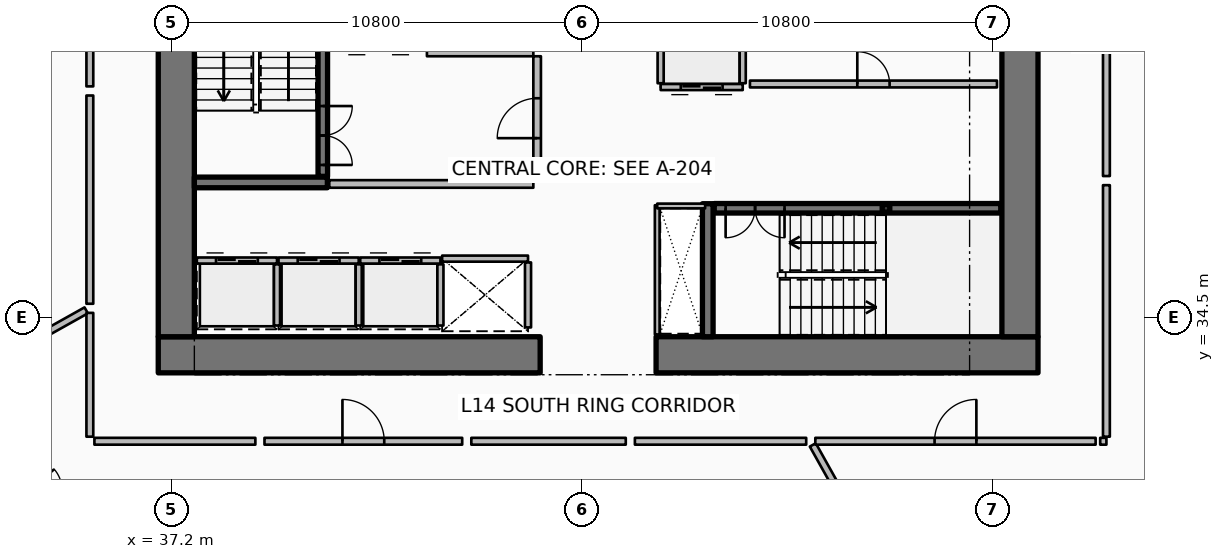
"""IFC4 building model, lengths in metres.
Left out: names, types, materials, properties, quantities, classifications, styles, units other than length and angle.
Written with IfcOpenShell. Run it as: python <this file> out.ifc"""

import sys

from ifc_helpers import new_model, si_unit, direction, frame, frame_2d, origin, origin_2d, place, context, subcontext, project, spatial, rectangle, hollow_rectangle, extrude, element, fill, save


model = new_model("IFC4")
c1 = context("Model", 3, precision=1e-05, world=origin(), true_north=direction((0.0, 1.0)))
c2 = subcontext(c1, "Body", "Model", "MODEL_VIEW")
j1 = project(units=[si_unit("LENGTHUNIT", "METRE"), si_unit("PLANEANGLEUNIT", "RADIAN")], contexts=[c1])
p1 = place(None, origin())
s1 = spatial("IfcSite", under=j1, at=p1, CompositionType="ELEMENT")
p2 = place(p1, origin())
s2 = spatial("IfcBuilding", under=s1, at=p2, CompositionType="ELEMENT")
p3 = place(p2, frame((0.0, 0.0, 60.15)))
s3 = spatial("IfcBuildingStorey", under=s2, at=p3, CompositionType="ELEMENT", Elevation=60.15)
p4 = place(p3, frame((36.85, 33.525, 0.0), z_axis=(0.0, 0.0, 1.0), x_axis=(1.0, 0.0, 0.0)))
e1 = element("IfcWall", 1, at=p4, inside=s3, PredefinedType="SHEAR", context=c2, shape_type="SweptSolid", body=[
    extrude(rectangle(XDim=10.05, YDim=0.95, at=frame_2d((5.025, 0.0))), origin(), (0.0, 0.0, 1.0), 3.75),
])
p5 = place(p3, frame((49.95, 33.525, 0.0), z_axis=(0.0, 0.0, 1.0), x_axis=(1.0, 0.0, 0.0)))
e2 = element("IfcWall", 2, at=p5, inside=s3, PredefinedType="SHEAR", context=c2, shape_type="SweptSolid", body=[
    extrude(rectangle(XDim=10.05, YDim=0.95, at=frame_2d((5.025, 0.0))), origin(), (0.0, 0.0, 1.0), 3.75),
])
for number, where, z_axis, x_axis in (
    (3, (37.325, 34.0, 0.0), (0.0, 0.0, 1.0), (0.0, 1.0, 0.0)),
    (4, (59.525, 34.0, 0.0), (0.0, 0.0, 1.0), (0.0, 1.0, 0.0)),
):
    element("IfcWall", number, at=place(p3, frame(where, z_axis=z_axis, x_axis=x_axis)), inside=s3, PredefinedType="SHEAR", context=c2, shape_type="SweptSolid", body=[
        extrude(rectangle(XDim=16.0, YDim=0.95, at=frame_2d((8.0, 0.0))), origin(), (0.0, 0.0, 1.0), 3.75),
    ])
for number, where, z_axis, x_axis in (
    (5, (37.8, 38.06, 0.0), (0.0, 0.0, 1.0), (1.0, 0.0, 0.0)),
    (6, (51.31, 34.0, 0.0), (0.0, 0.0, 1.0), (0.0, 1.0, 0.0)),
):
    element("IfcWall", number, at=place(p3, frame(where, z_axis=z_axis, x_axis=x_axis)), inside=s3, PredefinedType="SHEAR", context=c2, shape_type="SweptSolid", body=[
        extrude(rectangle(XDim=3.5, YDim=0.28, at=frame_2d((1.75, 0.0))), origin(), (0.0, 0.0, 1.0), 3.75),
    ])
p6 = place(p3, frame((56.0, 37.38, 0.0), z_axis=(0.0, 0.0, 1.0), x_axis=(1.0, 0.0, 0.0)))
e7 = element("IfcColumn", 7, at=p6, inside=s3, PredefinedType="COLUMN", context=c2, shape_type="SweptSolid", body=[
    extrude(hollow_rectangle(XDim=0.2, YDim=0.2, WallThickness=0.01, InnerFilletRadius=0.01, OuterFilletRadius=0.02, at=origin_2d()), origin(), (0.0, 0.0, 1.0), 1.67),
])
p7 = place(p3, frame((41.18, 38.22, 0.0), z_axis=(0.0, 0.0, 1.0), x_axis=(0.0, 1.0, 0.0)))
e8 = element("IfcWall", 8, at=p7, inside=s3, PredefinedType="SOLIDWALL", context=c2, shape_type="SweptSolid", body=[
    extrude(rectangle(XDim=7.56, YDim=0.25, at=frame_2d((3.78, 0.0))), origin(), (0.0, 0.0, 1.0), 3.5),
])
p8 = place(p7, frame((0.3, 0.0, 0.0)))
e9 = element("IfcOpeningElement", 9, at=p8, cuts=e8, PredefinedType="OPENING", context=c2, shape_type="SweptSolid", body=[
    extrude(rectangle(XDim=1.55, YDim=2.15, at=frame_2d((0.775, 1.075))), frame((0.0, 0.135, 0.0), z_axis=(0.0, -1.0, 0.0), x_axis=(1.0, 0.0, 0.0)), (0.0, 0.0, 1.0), 0.27),
])
p9 = place(p3, frame((51.48, 37.38, 0.0), z_axis=(0.0, 0.0, 1.0), x_axis=(1.0, 0.0, 0.0)))
e10 = element("IfcWall", 10, at=p9, inside=s3, PredefinedType="SOLIDWALL", context=c2, shape_type="SweptSolid", body=[
    extrude(rectangle(XDim=7.54, YDim=0.25, at=frame_2d((3.77, 0.0))), origin(), (0.0, 0.0, 1.0), 3.5),
])
p10 = place(p9, frame((0.3, 0.0, 0.0)))
e11 = element("IfcOpeningElement", 11, at=p10, cuts=e10, PredefinedType="OPENING", context=c2, shape_type="SweptSolid", body=[
    extrude(rectangle(XDim=1.55, YDim=2.15, at=frame_2d((0.775, 1.075))), frame((0.0, 0.135, 0.0), z_axis=(0.0, -1.0, 0.0), x_axis=(1.0, 0.0, 0.0)), (0.0, 0.0, 1.0), 0.27),
])
p11 = place(p3, frame((37.865, 36.005, 0.0), z_axis=(0.0, 0.0, 1.0), x_axis=(1.0, 0.0, 0.0)))
e12 = element("IfcWall", 12, at=p11, inside=s3, PredefinedType="PARTITIONING", context=c2, shape_type="SweptSolid", body=[
    extrude(rectangle(XDim=2.11, YDim=0.16, at=frame_2d((1.055, 0.0))), origin(), (0.0, 0.0, 1.0), 3.5),
])
p12 = place(p11, frame((0.505, 0.0, 0.0)))
e13 = element("IfcOpeningElement", 13, at=p12, cuts=e12, PredefinedType="OPENING", context=c2, shape_type="SweptSolid", body=[
    extrude(rectangle(XDim=1.1, YDim=2.1, at=frame_2d((0.55, 1.05))), frame((0.0, 0.09, 0.0), z_axis=(0.0, -1.0, 0.0), x_axis=(1.0, 0.0, 0.0)), (0.0, 0.0, 1.0), 0.18),
])
p13 = place(p3, frame((39.975, 34.295, 0.0), z_axis=(0.0, 0.0, 1.0), x_axis=(0.0, 1.0, 0.0)))
e14 = element("IfcWall", 14, at=p13, inside=s3, PredefinedType="PARTITIONING", context=c2, shape_type="SweptSolid", body=[
    extrude(rectangle(XDim=1.61, YDim=0.16, at=frame_2d((0.805, 0.0))), origin(), (0.0, 0.0, 1.0), 3.5),
])
p14 = place(p3, frame((40.015, 36.005, 0.0), z_axis=(0.0, 0.0, 1.0), x_axis=(1.0, 0.0, 0.0)))
e15 = element("IfcWall", 15, at=p14, inside=s3, PredefinedType="PARTITIONING", context=c2, shape_type="SweptSolid", body=[
    extrude(rectangle(XDim=2.11, YDim=0.16, at=frame_2d((1.055, 0.0))), origin(), (0.0, 0.0, 1.0), 3.5),
])
p15 = place(p14, frame((0.505, 0.0, 0.0)))
e16 = element("IfcOpeningElement", 16, at=p15, cuts=e15, PredefinedType="OPENING", context=c2, shape_type="SweptSolid", body=[
    extrude(rectangle(XDim=1.1, YDim=2.1, at=frame_2d((0.55, 1.05))), frame((0.0, 0.09, 0.0), z_axis=(0.0, -1.0, 0.0), x_axis=(1.0, 0.0, 0.0)), (0.0, 0.0, 1.0), 0.18),
])
p16 = place(p3, frame((42.125, 34.295, 0.0), z_axis=(0.0, 0.0, 1.0), x_axis=(0.0, 1.0, 0.0)))
e17 = element("IfcWall", 17, at=p16, inside=s3, PredefinedType="PARTITIONING", context=c2, shape_type="SweptSolid", body=[
    extrude(rectangle(XDim=1.61, YDim=0.16, at=frame_2d((0.805, 0.0))), origin(), (0.0, 0.0, 1.0), 3.5),
])
p17 = place(p3, frame((42.165, 36.005, 0.0), z_axis=(0.0, 0.0, 1.0), x_axis=(1.0, 0.0, 0.0)))
e18 = element("IfcWall", 18, at=p17, inside=s3, PredefinedType="PARTITIONING", context=c2, shape_type="SweptSolid", body=[
    extrude(rectangle(XDim=2.11, YDim=0.16, at=frame_2d((1.055, 0.0))), origin(), (0.0, 0.0, 1.0), 3.5),
])
p18 = place(p17, frame((0.505, 0.0, 0.0)))
e19 = element("IfcOpeningElement", 19, at=p18, cuts=e18, PredefinedType="OPENING", context=c2, shape_type="SweptSolid", body=[
    extrude(rectangle(XDim=1.1, YDim=2.1, at=frame_2d((0.55, 1.05))), frame((0.0, 0.09, 0.0), z_axis=(0.0, -1.0, 0.0), x_axis=(1.0, 0.0, 0.0)), (0.0, 0.0, 1.0), 0.18),
])
p19 = place(p3, frame((44.275, 34.295, 0.0), z_axis=(0.0, 0.0, 1.0), x_axis=(0.0, 1.0, 0.0)))
e20 = element("IfcWall", 20, at=p19, inside=s3, PredefinedType="PARTITIONING", context=c2, shape_type="SweptSolid", body=[
    extrude(rectangle(XDim=1.61, YDim=0.16, at=frame_2d((0.805, 0.0))), origin(), (0.0, 0.0, 1.0), 3.5),
])
p20 = place(p3, frame((44.32, 36.055, 0.0), z_axis=(0.0, 0.0, 1.0), x_axis=(1.0, 0.0, 0.0)))
e21 = element("IfcWall", 21, at=p20, inside=s3, PredefinedType="PARTITIONING", context=c2, shape_type="SweptSolid", body=[
    extrude(rectangle(XDim=2.26, YDim=0.16, at=frame_2d((1.13, 0.0))), origin(), (0.0, 0.0, 1.0), 3.5),
])
p21 = place(p3, frame((46.58, 34.245, 0.0), z_axis=(0.0, 0.0, 1.0), x_axis=(0.0, 1.0, 0.0)))
e22 = element("IfcWall", 22, at=p21, inside=s3, PredefinedType="PARTITIONING", context=c2, shape_type="SweptSolid", body=[
    extrude(rectangle(XDim=1.71, YDim=0.16, at=frame_2d((0.855, 0.0))), origin(), (0.0, 0.0, 1.0), 3.5),
])
p22 = place(p3, frame((52.23, 40.57, 0.0), z_axis=(0.0, 0.0, 1.0), x_axis=(-1.0, 0.0, 0.0)))
e23 = element("IfcWall", 23, at=p22, inside=s3, PredefinedType="PARTITIONING", context=c2, shape_type="SweptSolid", body=[
    extrude(rectangle(XDim=2.16, YDim=0.16, at=frame_2d((1.08, 0.0))), origin(), (0.0, 0.0, 1.0), 3.5),
])
p23 = place(p22, frame((0.53, 0.0, 0.0)))
e24 = element("IfcOpeningElement", 24, at=p23, cuts=e23, PredefinedType="OPENING", context=c2, shape_type="SweptSolid", body=[
    extrude(rectangle(XDim=1.1, YDim=2.1, at=frame_2d((0.55, 1.05))), frame((0.0, 0.09, 0.0), z_axis=(0.0, -1.0, 0.0), x_axis=(1.0, 0.0, 0.0)), (0.0, 0.0, 1.0), 0.18),
])
for number, where, z_axis, x_axis in (
    (25, (52.23, 40.67, 0.0), (0.0, 0.0, 1.0), (0.0, 1.0, 0.0)),
    (26, (50.07, 40.67, 0.0), (0.0, 0.0, 1.0), (0.0, 1.0, 0.0)),
):
    element("IfcWall", number, at=place(p3, frame(where, z_axis=z_axis, x_axis=x_axis)), inside=s3, PredefinedType="PARTITIONING", context=c2, shape_type="SweptSolid", body=[
        extrude(rectangle(XDim=2.16, YDim=0.16, at=frame_2d((1.08, 0.0))), origin(), (0.0, 0.0, 1.0), 3.5),
    ])
p24 = place(p3, frame((52.42, 40.65, 0.0), z_axis=(0.0, 0.0, 1.0), x_axis=(1.0, 0.0, 0.0)))
e27 = element("IfcWall", 27, at=p24, inside=s3, PredefinedType="PARTITIONING", context=c2, shape_type="SweptSolid", body=[
    extrude(rectangle(XDim=6.5, YDim=0.18, at=frame_2d((3.25, 0.0))), origin(), (0.0, 0.0, 1.0), 3.5),
])
p25 = place(p24, frame((2.825, 0.0, 0.0)))
e28 = element("IfcOpeningElement", 28, at=p25, cuts=e27, PredefinedType="OPENING", context=c2, shape_type="SweptSolid", body=[
    extrude(rectangle(XDim=0.85, YDim=2.06, at=frame_2d((0.425, 1.03))), frame((0.0, 0.1, 0.0), z_axis=(0.0, -1.0, 0.0), x_axis=(1.0, 0.0, 0.0)), (0.0, 0.0, 1.0), 0.2),
])
p26 = place(p3, frame((41.35, 38.02, 0.0), z_axis=(0.0, 0.0, 1.0), x_axis=(1.0, 0.0, 0.0)))
e29 = element("IfcWall", 29, at=p26, inside=s3, PredefinedType="PARTITIONING", context=c2, shape_type="SweptSolid", body=[
    extrude(rectangle(XDim=5.37, YDim=0.2, at=frame_2d((2.685, 0.0))), origin(), (0.0, 0.0, 1.0), 3.5),
])
p27 = place(p3, frame((43.92, 41.48, 0.0), z_axis=(0.0, 0.0, 1.0), x_axis=(1.0, 0.0, 0.0)))
e30 = element("IfcWall", 30, at=p27, inside=s3, PredefinedType="PARTITIONING", context=c2, shape_type="SweptSolid", body=[
    extrude(rectangle(XDim=2.8, YDim=0.2, at=frame_2d((1.4, 0.0))), origin(), (0.0, 0.0, 1.0), 3.5),
])
p28 = place(p3, frame((46.82, 38.12, 0.0), z_axis=(0.0, 0.0, 1.0), x_axis=(0.0, 1.0, 0.0)))
e31 = element("IfcWall", 31, at=p28, inside=s3, PredefinedType="PARTITIONING", context=c2, shape_type="SweptSolid", body=[
    extrude(rectangle(XDim=3.26, YDim=0.2, at=frame_2d((1.63, 0.0))), origin(), (0.0, 0.0, 1.0), 3.5),
])
p29 = place(p28, frame((1.105, 0.0, 0.0)))
e32 = element("IfcOpeningElement", 32, at=p29, cuts=e31, PredefinedType="OPENING", context=c2, shape_type="SweptSolid", body=[
    extrude(rectangle(XDim=1.05, YDim=2.1, at=frame_2d((0.525, 1.05))), frame((0.0, 0.11, 0.0), z_axis=(0.0, -1.0, 0.0), x_axis=(1.0, 0.0, 0.0)), (0.0, 0.0, 1.0), 0.22),
])
p30 = place(p3, frame((49.98, 34.06, 0.0), z_axis=(0.0, 0.0, 1.0), x_axis=(0.0, 1.0, 0.0)))
e33 = element("IfcWall", 33, at=p30, inside=s3, PredefinedType="PARTITIONING", context=c2, shape_type="SweptSolid", body=[
    extrude(rectangle(XDim=3.4, YDim=0.125, at=frame_2d((1.7, 0.0))), origin(), (0.0, 0.0, 1.0), 2.94),
])
p31 = place(p3, frame((49.98, 37.44, 0.0), z_axis=(0.0, 0.0, 1.0), x_axis=(1.0, 0.0, 0.0)))
e34 = element("IfcWall", 34, at=p31, inside=s3, PredefinedType="PARTITIONING", context=c2, shape_type="SweptSolid", body=[
    extrude(rectangle(XDim=1.26, YDim=0.125, at=frame_2d((0.63, 0.0))), origin(), (0.0, 0.0, 1.0), 2.94),
])
p32 = place(p3, frame((34.954, 34.694, 0.0), z_axis=(0.0, 0.0, 1.0), x_axis=(-0.872493465611, -0.488625779577, 0.0)))
e35 = element("IfcWall", 35, at=p32, inside=s3, PredefinedType="PARTITIONING", context=c2, shape_type="SweptSolid", body=[
    extrude(rectangle(XDim=16.586, YDim=0.18, at=frame_2d((8.293, 0.0))), origin(), (0.0, 0.0, 1.0), 2.867),
])
p33 = place(p3, frame((54.074, 31.154, 0.0), z_axis=(0.0, 0.0, 1.0), x_axis=(0.48862612996, -0.872493269384, 0.0)))
e36 = element("IfcWall", 36, at=p33, inside=s3, PredefinedType="PARTITIONING", context=c2, shape_type="SweptSolid", body=[
    extrude(rectangle(XDim=13.065, YDim=0.18, at=frame_2d((6.532, 0.0))), origin(), (0.0, 0.0, 1.0), 2.867),
])
p34 = place(p3, frame((35.05, 45.532, 0.0), z_axis=(0.0, 0.0, 1.0), x_axis=(0.0, -1.0, 0.0)))
e37 = element("IfcWall", 37, at=p34, inside=s3, PredefinedType="PARTITIONING", context=c2, shape_type="SweptSolid", body=[
    extrude(rectangle(XDim=4.945, YDim=0.18, at=frame_2d((2.472, 0.0))), origin(), (0.0, 0.0, 1.0), 2.867),
])
p35 = place(p3, frame((35.05, 40.347, 0.0), z_axis=(0.0, 0.0, 1.0), x_axis=(0.0, -1.0, 0.0)))
e38 = element("IfcWall", 38, at=p35, inside=s3, PredefinedType="PARTITIONING", context=c2, shape_type="SweptSolid", body=[
    extrude(rectangle(XDim=5.48, YDim=0.18, at=frame_2d((2.74, 0.0))), origin(), (0.0, 0.0, 1.0), 2.867),
])
p36 = place(p3, frame((39.646, 31.25, 0.0), z_axis=(0.0, 0.0, 1.0), x_axis=(1.0, 0.0, 0.0)))
e39 = element("IfcWall", 39, at=p36, inside=s3, PredefinedType="PARTITIONING", context=c2, shape_type="SweptSolid", body=[
    extrude(rectangle(XDim=5.203, YDim=0.18, at=frame_2d((2.601, 0.0))), origin(), (0.0, 0.0, 1.0), 2.867),
])
p37 = place(p36, frame((2.052, 0.0, 0.0)))
e40 = element("IfcOpeningElement", 40, at=p37, cuts=e39, PredefinedType="OPENING", context=c2, shape_type="SweptSolid", body=[
    extrude(rectangle(XDim=1.1, YDim=2.1, at=frame_2d((0.55, 1.05))), frame((0.0, 0.1, 0.0), z_axis=(0.0, -1.0, 0.0), x_axis=(1.0, 0.0, 0.0)), (0.0, 0.0, 1.0), 0.2),
])
p38 = place(p3, frame((35.05, 34.628, 0.0), z_axis=(0.0, 0.0, 1.0), x_axis=(0.0, -1.0, 0.0)))
e41 = element("IfcWall", 41, at=p38, inside=s3, PredefinedType="PARTITIONING", context=c2, shape_type="SweptSolid", body=[
    extrude(rectangle(XDim=3.258, YDim=0.18, at=frame_2d((1.629, 0.0))), origin(), (0.0, 0.0, 1.0), 2.867),
])
p39 = place(p3, frame((35.17, 31.25, 0.0), z_axis=(0.0, 0.0, 1.0), x_axis=(1.0, 0.0, 0.0)))
e42 = element("IfcWall", 42, at=p39, inside=s3, PredefinedType="PARTITIONING", context=c2, shape_type="SweptSolid", body=[
    extrude(rectangle(XDim=4.236, YDim=0.18, at=frame_2d((2.118, 0.0))), origin(), (0.0, 0.0, 1.0), 2.867),
])
p40 = place(p3, frame((33.075, 30.413, 0.0), z_axis=(0.0, 0.0, 1.0), x_axis=(0.655021066846, -0.755610615322, 0.0)))
e43 = element("IfcWall", 43, at=p40, inside=s3, PredefinedType="PARTITIONING", context=c2, shape_type="SweptSolid", body=[
    extrude(rectangle(XDim=2.053, YDim=0.125, at=frame_2d((1.027, 0.0))), origin(), (0.0, 0.0, 1.0), 2.94),
])
p41 = place(p40, frame((0.602, 0.0, 0.0)))
e44 = element("IfcOpeningElement", 44, at=p41, cuts=e43, PredefinedType="OPENING", context=c2, shape_type="SweptSolid", body=[
    extrude(rectangle(XDim=0.85, YDim=2.06, at=frame_2d((0.425, 1.03))), frame((0.0, 0.073, 0.0), z_axis=(0.0, -1.0, 0.0), x_axis=(1.0, 0.0, 0.0)), (0.0, 0.0, 1.0), 0.145),
])
p42 = place(p3, frame((45.088, 31.25, 0.0), z_axis=(0.0, 0.0, 1.0), x_axis=(1.0, 0.0, 0.0)))
e45 = element("IfcWall", 45, at=p42, inside=s3, PredefinedType="PARTITIONING", context=c2, shape_type="SweptSolid", body=[
    extrude(rectangle(XDim=4.064, YDim=0.18, at=frame_2d((2.032, 0.0))), origin(), (0.0, 0.0, 1.0), 2.867),
])
p43 = place(p3, frame((49.392, 31.25, 0.0), z_axis=(0.0, 0.0, 1.0), x_axis=(1.0, 0.0, 0.0)))
e46 = element("IfcWall", 46, at=p43, inside=s3, PredefinedType="PARTITIONING", context=c2, shape_type="SweptSolid", body=[
    extrude(rectangle(XDim=4.508, YDim=0.18, at=frame_2d((2.254, 0.0))), origin(), (0.0, 0.0, 1.0), 2.867),
])
p44 = place(p3, frame((54.14, 31.25, 0.0), z_axis=(0.0, 0.0, 1.0), x_axis=(1.0, 0.0, 0.0)))
e47 = element("IfcWall", 47, at=p44, inside=s3, PredefinedType="PARTITIONING", context=c2, shape_type="SweptSolid", body=[
    extrude(rectangle(XDim=7.376, YDim=0.18, at=frame_2d((3.688, 0.0))), origin(), (0.0, 0.0, 1.0), 2.867),
])
p45 = place(p44, frame((3.138, 0.0, 0.0)))
e48 = element("IfcOpeningElement", 48, at=p45, cuts=e47, PredefinedType="OPENING", context=c2, shape_type="SweptSolid", body=[
    extrude(rectangle(XDim=1.1, YDim=2.1, at=frame_2d((0.55, 1.05))), frame((0.0, 0.1, 0.0), z_axis=(0.0, -1.0, 0.0), x_axis=(1.0, 0.0, 0.0)), (0.0, 0.0, 1.0), 0.2),
])
p46 = place(p3, frame((61.636, 31.25, 0.0), z_axis=(0.0, 0.0, 1.0), x_axis=(1.0, 0.0, 0.0)))
e49 = element("IfcWall", 49, at=p46, inside=s3, PredefinedType="PARTITIONING", context=c2, shape_type="SweptSolid", body=[
    extrude(rectangle(XDim=0.164, YDim=0.18, at=frame_2d((0.082, 0.0))), origin(), (0.0, 0.0, 1.0), 2.867),
])
p47 = place(p3, frame((61.8, 31.37, 0.0), z_axis=(0.0, 0.0, 1.0), x_axis=(0.0, 1.0, 0.0)))
e50 = element("IfcWall", 50, at=p47, inside=s3, PredefinedType="PARTITIONING", context=c2, shape_type="SweptSolid", body=[
    extrude(rectangle(XDim=6.618, YDim=0.18, at=frame_2d((3.309, 0.0))), origin(), (0.0, 0.0, 1.0), 2.867),
])
p48 = place(p3, frame((61.8, 38.228, 0.0), z_axis=(0.0, 0.0, 1.0), x_axis=(0.0, 1.0, 0.0)))
e51 = element("IfcWall", 51, at=p48, inside=s3, PredefinedType="PARTITIONING", context=c2, shape_type="SweptSolid", body=[
    extrude(rectangle(XDim=5.285, YDim=0.18, at=frame_2d((2.643, 0.0))), origin(), (0.0, 0.0, 1.0), 2.867),
])
p49 = place(p8, origin())
e52 = element("IfcDoor", 52, at=p49, inside=s3, OperationType="DOUBLE_DOOR_SINGLE_SWING", PredefinedType="DOOR", context=c2, shape_type="SweptSolid", body=[
    extrude(rectangle(XDim=1.55, YDim=2.15, at=frame_2d((0.775, 1.075))), frame((0.0, 0.025, 0.0), z_axis=(0.0, -1.0, 0.0), x_axis=(1.0, 0.0, 0.0)), (0.0, 0.0, 1.0), 0.05),
])
fill(e9, e52)
p50 = place(p10, origin())
e53 = element("IfcDoor", 53, at=p50, inside=s3, OperationType="DOUBLE_DOOR_SINGLE_SWING", PredefinedType="DOOR", context=c2, shape_type="SweptSolid", body=[
    extrude(rectangle(XDim=1.55, YDim=2.15, at=frame_2d((0.775, 1.075))), frame((0.0, 0.025, 0.0), z_axis=(0.0, -1.0, 0.0), x_axis=(1.0, 0.0, 0.0)), (0.0, 0.0, 1.0), 0.05),
])
fill(e11, e53)
p51 = place(p12, origin())
e54 = element("IfcDoor", 54, at=p51, inside=s3, OperationType="DOUBLE_DOOR_SLIDING", PredefinedType="DOOR", context=c2, shape_type="SweptSolid", body=[
    extrude(rectangle(XDim=1.1, YDim=2.1, at=frame_2d((0.55, 1.05))), frame((0.0, 0.025, 0.0), z_axis=(0.0, -1.0, 0.0), x_axis=(1.0, 0.0, 0.0)), (0.0, 0.0, 1.0), 0.05),
])
fill(e13, e54)
p52 = place(p15, origin())
e55 = element("IfcDoor", 55, at=p52, inside=s3, OperationType="DOUBLE_DOOR_SLIDING", PredefinedType="DOOR", context=c2, shape_type="SweptSolid", body=[
    extrude(rectangle(XDim=1.1, YDim=2.1, at=frame_2d((0.55, 1.05))), frame((0.0, 0.025, 0.0), z_axis=(0.0, -1.0, 0.0), x_axis=(1.0, 0.0, 0.0)), (0.0, 0.0, 1.0), 0.05),
])
fill(e16, e55)
p53 = place(p18, origin())
e56 = element("IfcDoor", 56, at=p53, inside=s3, OperationType="DOUBLE_DOOR_SLIDING", PredefinedType="DOOR", context=c2, shape_type="SweptSolid", body=[
    extrude(rectangle(XDim=1.1, YDim=2.1, at=frame_2d((0.55, 1.05))), frame((0.0, 0.025, 0.0), z_axis=(0.0, -1.0, 0.0), x_axis=(1.0, 0.0, 0.0)), (0.0, 0.0, 1.0), 0.05),
])
fill(e19, e56)
p54 = place(p23, origin())
e57 = element("IfcDoor", 57, at=p54, inside=s3, OperationType="DOUBLE_DOOR_SLIDING", PredefinedType="DOOR", context=c2, shape_type="SweptSolid", body=[
    extrude(rectangle(XDim=1.1, YDim=2.1, at=frame_2d((0.55, 1.05))), frame((0.0, 0.025, 0.0), z_axis=(0.0, -1.0, 0.0), x_axis=(1.0, 0.0, 0.0)), (0.0, 0.0, 1.0), 0.05),
])
fill(e24, e57)
p55 = place(p25, origin())
e58 = element("IfcDoor", 58, at=p55, inside=s3, OperationType="SINGLE_SWING_LEFT", PredefinedType="DOOR", context=c2, shape_type="SweptSolid", body=[
    extrude(rectangle(XDim=0.85, YDim=2.06, at=frame_2d((0.425, 1.03))), frame((0.0, 0.025, 0.0), z_axis=(0.0, -1.0, 0.0), x_axis=(1.0, 0.0, 0.0)), (0.0, 0.0, 1.0), 0.05),
])
fill(e28, e58)
p56 = place(p29, origin())
e59 = element("IfcDoor", 59, at=p56, inside=s3, OperationType="SINGLE_SWING_LEFT", PredefinedType="DOOR", context=c2, shape_type="SweptSolid", body=[
    extrude(rectangle(XDim=1.05, YDim=2.1, at=frame_2d((0.525, 1.05))), frame((0.0, 0.025, 0.0), z_axis=(0.0, -1.0, 0.0), x_axis=(1.0, 0.0, 0.0)), (0.0, 0.0, 1.0), 0.05),
])
fill(e32, e59)
p57 = place(p37, origin())
e60 = element("IfcDoor", 60, at=p57, inside=s3, OperationType="SINGLE_SWING_LEFT", PredefinedType="DOOR", context=c2, shape_type="SweptSolid", body=[
    extrude(rectangle(XDim=1.1, YDim=2.1, at=frame_2d((0.55, 1.05))), frame((0.0, 0.025, 0.0), z_axis=(0.0, -1.0, 0.0), x_axis=(1.0, 0.0, 0.0)), (0.0, 0.0, 1.0), 0.05),
])
fill(e40, e60)
p58 = place(p45, origin())
e61 = element("IfcDoor", 61, at=p58, inside=s3, OperationType="SINGLE_SWING_RIGHT", PredefinedType="DOOR", context=c2, shape_type="SweptSolid", body=[
    extrude(rectangle(XDim=1.1, YDim=2.1, at=frame_2d((0.55, 1.05))), frame((0.0, 0.025, 0.0), z_axis=(0.0, -1.0, 0.0), x_axis=(1.0, 0.0, 0.0)), (0.0, 0.0, 1.0), 0.05),
])
fill(e48, e61)
save(model, sys.argv[1])
